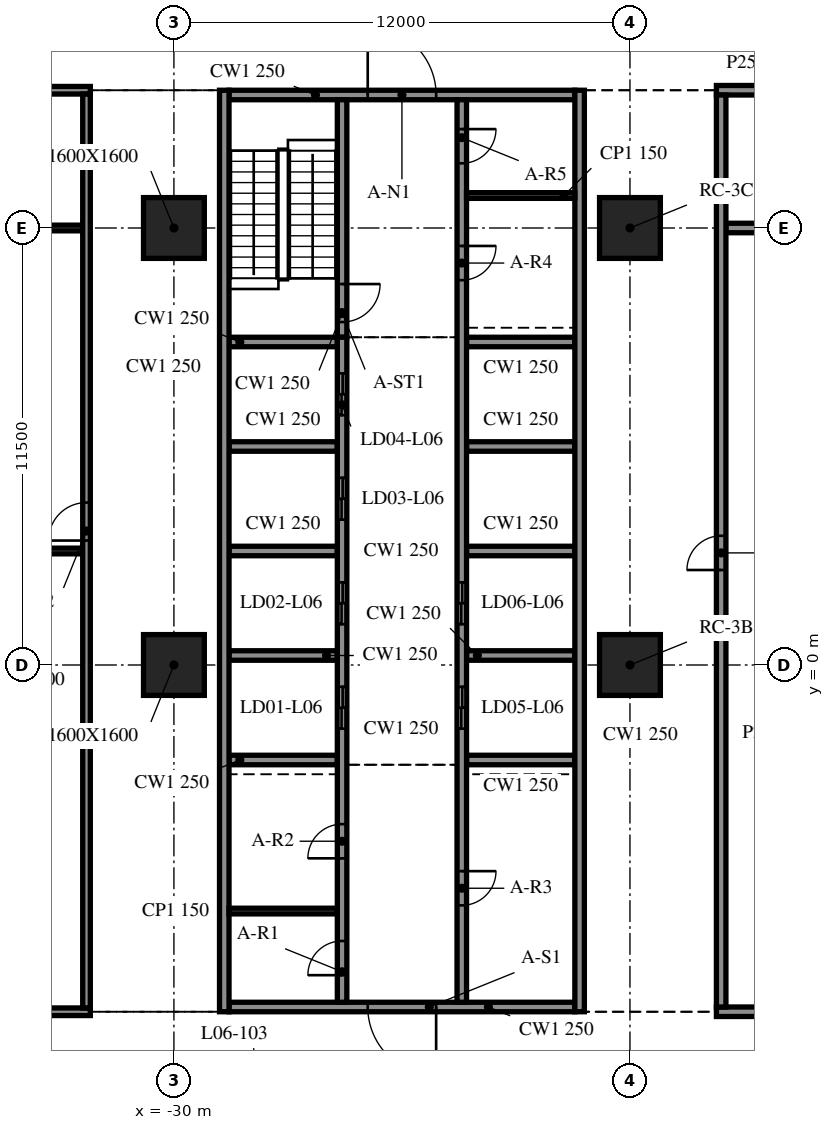
"""IFC4 building model, lengths in metres.
Left out: names, types, materials, properties, quantities, classifications, styles, units other than length and angle.
Written with IfcOpenShell. Run it as: python <this file> out.ifc"""

import sys

from ifc_helpers import new_model, si_unit, direction, frame, frame_2d, origin, origin_2d, place, context, subcontext, project, spatial, rectangle, extrude, element, fill, save


model = new_model("IFC4")
c1 = context("Model", 3, precision=1e-05, world=origin(), true_north=direction((0.0, 1.0)))
c2 = subcontext(c1, "Body", "Model", "MODEL_VIEW")
j1 = project(units=[si_unit("LENGTHUNIT", "METRE"), si_unit("PLANEANGLEUNIT", "RADIAN")], contexts=[c1])
p1 = place(None, origin())
s1 = spatial("IfcSite", under=j1, at=p1, CompositionType="ELEMENT")
p2 = place(p1, origin())
s2 = spatial("IfcBuilding", under=s1, at=p2, CompositionType="ELEMENT")
p3 = place(p2, frame((0.0, 0.0, 28.7)))
s3 = spatial("IfcBuildingStorey", under=s2, at=p3, CompositionType="ELEMENT", Elevation=28.7)
for number, where, z_axis, x_axis in (
    (1, (-30.0, 0.0, -0.34), (0.0, 0.0, 1.0), (1.0, 0.0, 0.0)),
    (2, (-30.0, 11.5, -0.34), (0.0, 0.0, 1.0), (1.0, 0.0, 0.0)),
    (3, (-18.0, 0.0, -0.34), (0.0, 0.0, 1.0), (1.0, 0.0, 0.0)),
    (4, (-18.0, 11.5, -0.34), (0.0, 0.0, 1.0), (1.0, 0.0, 0.0)),
):
    element("IfcColumn", number, at=place(p3, frame(where, z_axis=z_axis, x_axis=x_axis)), inside=s3, PredefinedType="COLUMN", context=c2, shape_type="SweptSolid", body=[
        extrude(rectangle(XDim=1.6, YDim=1.6, at=origin_2d()), origin(), (0.0, 0.0, 1.0), 4.3),
    ])
for number, where, z_axis, x_axis in (
    (5, (-28.675, 15.125, 0.0), (0.0, 0.0, 1.0), (0.0, -1.0, 0.0)),
    (6, (-19.325, -9.125, 0.0), (0.0, 0.0, 1.0), (0.0, 1.0, 0.0)),
):
    element("IfcWall", number, at=place(p3, frame(where, z_axis=z_axis, x_axis=x_axis)), inside=s3, PredefinedType="SOLIDWALL", context=c2, shape_type="SweptSolid", body=[
        extrude(rectangle(XDim=24.25, YDim=0.25, at=frame_2d((12.125, 0.0))), origin(), (0.0, 0.0, 1.0), 3.96),
    ])
p4 = place(p3, frame((-19.45, -9.0, 0.0), z_axis=(0.0, 0.0, 1.0), x_axis=(-1.0, 0.0, 0.0)))
e7 = element("IfcWall", 7, at=p4, inside=s3, PredefinedType="SOLIDWALL", context=c2, shape_type="SweptSolid", body=[
    extrude(rectangle(XDim=9.1, YDim=0.25, at=frame_2d((4.55, 0.0))), origin(), (0.0, 0.0, 1.0), 3.96),
])
p5 = place(p4, frame((3.65, 0.0, 0.0)))
e8 = element("IfcOpeningElement", 8, at=p5, cuts=e7, PredefinedType="OPENING", context=c2, shape_type="SweptSolid", body=[
    extrude(rectangle(XDim=1.8, YDim=2.1, at=frame_2d((0.9, 1.05))), frame((0.0, 0.135, 0.0), z_axis=(0.0, -1.0, 0.0), x_axis=(1.0, 0.0, 0.0)), (0.0, 0.0, 1.0), 0.27),
])
p6 = place(p3, frame((-28.55, 15.0, 0.0), z_axis=(0.0, 0.0, 1.0), x_axis=(1.0, 0.0, 0.0)))
e9 = element("IfcWall", 9, at=p6, inside=s3, PredefinedType="SOLIDWALL", context=c2, shape_type="SweptSolid", body=[
    extrude(rectangle(XDim=9.1, YDim=0.25, at=frame_2d((4.55, 0.0))), origin(), (0.0, 0.0, 1.0), 3.96),
])
p7 = place(p6, frame((3.65, 0.0, 0.0)))
e10 = element("IfcOpeningElement", 10, at=p7, cuts=e9, PredefinedType="OPENING", context=c2, shape_type="SweptSolid", body=[
    extrude(rectangle(XDim=1.8, YDim=2.1, at=frame_2d((0.9, 1.05))), frame((0.0, 0.135, 0.0), z_axis=(0.0, -1.0, 0.0), x_axis=(1.0, 0.0, 0.0)), (0.0, 0.0, 1.0), 0.27),
])
p8 = place(p3, frame((-25.575, -8.875, 0.0), z_axis=(0.0, 0.0, 1.0), x_axis=(0.0, 1.0, 0.0)))
e11 = element("IfcWall", 11, at=p8, inside=s3, PredefinedType="SOLIDWALL", context=c2, shape_type="SweptSolid", body=[
    extrude(rectangle(XDim=17.5, YDim=0.25, at=frame_2d((8.75, 0.0))), origin(), (0.0, 0.0, 1.0), 3.96),
])
p9 = place(p8, frame((7.2, 0.0, 0.0)))
e12 = element("IfcOpeningElement", 12, at=p9, cuts=e11, PredefinedType="OPENING", context=c2, shape_type="SweptSolid", body=[
    extrude(rectangle(XDim=1.1, YDim=2.1, at=frame_2d((0.55, 1.05))), frame((0.0, 0.135, 0.0), z_axis=(0.0, -1.0, 0.0), x_axis=(1.0, 0.0, 0.0)), (0.0, 0.0, 1.0), 0.27),
])
p10 = place(p8, frame((9.95, 0.0, 0.0)))
e13 = element("IfcOpeningElement", 13, at=p10, cuts=e11, PredefinedType="OPENING", context=c2, shape_type="SweptSolid", body=[
    extrude(rectangle(XDim=1.1, YDim=2.1, at=frame_2d((0.55, 1.05))), frame((0.0, 0.135, 0.0), z_axis=(0.0, -1.0, 0.0), x_axis=(1.0, 0.0, 0.0)), (0.0, 0.0, 1.0), 0.27),
])
p11 = place(p8, frame((12.7, 0.0, 0.0)))
e14 = element("IfcOpeningElement", 14, at=p11, cuts=e11, PredefinedType="OPENING", context=c2, shape_type="SweptSolid", body=[
    extrude(rectangle(XDim=1.1, YDim=2.1, at=frame_2d((0.55, 1.05))), frame((0.0, 0.135, 0.0), z_axis=(0.0, -1.0, 0.0), x_axis=(1.0, 0.0, 0.0)), (0.0, 0.0, 1.0), 0.27),
])
p12 = place(p8, frame((15.45, 0.0, 0.0)))
e15 = element("IfcOpeningElement", 15, at=p12, cuts=e11, PredefinedType="OPENING", context=c2, shape_type="SweptSolid", body=[
    extrude(rectangle(XDim=1.1, YDim=2.1, at=frame_2d((0.55, 1.05))), frame((0.0, 0.135, 0.0), z_axis=(0.0, -1.0, 0.0), x_axis=(1.0, 0.0, 0.0)), (0.0, 0.0, 1.0), 0.27),
])
p13 = place(p8, frame((0.712, 0.0, 0.0)))
e16 = element("IfcOpeningElement", 16, at=p13, cuts=e11, PredefinedType="OPENING", context=c2, shape_type="SweptSolid", body=[
    extrude(rectangle(XDim=0.9, YDim=2.1, at=frame_2d((0.45, 1.05))), frame((0.0, 0.135, 0.0), z_axis=(0.0, -1.0, 0.0), x_axis=(1.0, 0.0, 0.0)), (0.0, 0.0, 1.0), 0.27),
])
p14 = place(p8, frame((3.788, 0.0, 0.0)))
e17 = element("IfcOpeningElement", 17, at=p14, cuts=e11, PredefinedType="OPENING", context=c2, shape_type="SweptSolid", body=[
    extrude(rectangle(XDim=0.9, YDim=2.1, at=frame_2d((0.45, 1.05))), frame((0.0, 0.135, 0.0), z_axis=(0.0, -1.0, 0.0), x_axis=(1.0, 0.0, 0.0)), (0.0, 0.0, 1.0), 0.27),
])
p15 = place(p3, frame((-25.575, 14.875, 0.0), z_axis=(0.0, 0.0, 1.0), x_axis=(0.0, -1.0, 0.0)))
e18 = element("IfcWall", 18, at=p15, inside=s3, PredefinedType="SOLIDWALL", context=c2, shape_type="SweptSolid", body=[
    extrude(rectangle(XDim=6.25, YDim=0.25, at=frame_2d((3.125, 0.0))), origin(), (0.0, 0.0, 1.0), 3.96),
])
p16 = place(p15, frame((4.85, 0.0, 0.0)))
e19 = element("IfcOpeningElement", 19, at=p16, cuts=e18, PredefinedType="OPENING", context=c2, shape_type="SweptSolid", body=[
    extrude(rectangle(XDim=1.0, YDim=2.1, at=frame_2d((0.5, 1.05))), frame((0.0, 0.135, 0.0), z_axis=(0.0, -1.0, 0.0), x_axis=(1.0, 0.0, 0.0)), (0.0, 0.0, 1.0), 0.27),
])
p17 = place(p3, frame((-22.425, 14.875, 0.0), z_axis=(0.0, 0.0, 1.0), x_axis=(0.0, -1.0, 0.0)))
e20 = element("IfcWall", 20, at=p17, inside=s3, PredefinedType="SOLIDWALL", context=c2, shape_type="SweptSolid", body=[
    extrude(rectangle(XDim=23.75, YDim=0.25, at=frame_2d((11.875, 0.0))), origin(), (0.0, 0.0, 1.0), 3.96),
])
p18 = place(p17, frame((15.45, 0.0, 0.0)))
e21 = element("IfcOpeningElement", 21, at=p18, cuts=e20, PredefinedType="OPENING", context=c2, shape_type="SweptSolid", body=[
    extrude(rectangle(XDim=1.1, YDim=2.1, at=frame_2d((0.55, 1.05))), frame((0.0, 0.135, 0.0), z_axis=(0.0, -1.0, 0.0), x_axis=(1.0, 0.0, 0.0)), (0.0, 0.0, 1.0), 0.27),
])
p19 = place(p17, frame((12.7, 0.0, 0.0)))
e22 = element("IfcOpeningElement", 22, at=p19, cuts=e20, PredefinedType="OPENING", context=c2, shape_type="SweptSolid", body=[
    extrude(rectangle(XDim=1.1, YDim=2.1, at=frame_2d((0.55, 1.05))), frame((0.0, 0.135, 0.0), z_axis=(0.0, -1.0, 0.0), x_axis=(1.0, 0.0, 0.0)), (0.0, 0.0, 1.0), 0.27),
])
p20 = place(p17, frame((20.3, 0.0, 0.0)))
e23 = element("IfcOpeningElement", 23, at=p20, cuts=e20, PredefinedType="OPENING", context=c2, shape_type="SweptSolid", body=[
    extrude(rectangle(XDim=0.9, YDim=2.1, at=frame_2d((0.45, 1.05))), frame((0.0, 0.135, 0.0), z_axis=(0.0, -1.0, 0.0), x_axis=(1.0, 0.0, 0.0)), (0.0, 0.0, 1.0), 0.27),
])
p21 = place(p17, frame((3.847, 0.0, 0.0)))
e24 = element("IfcOpeningElement", 24, at=p21, cuts=e20, PredefinedType="OPENING", context=c2, shape_type="SweptSolid", body=[
    extrude(rectangle(XDim=0.9, YDim=2.1, at=frame_2d((0.45, 1.05))), frame((0.0, 0.135, 0.0), z_axis=(0.0, -1.0, 0.0), x_axis=(1.0, 0.0, 0.0)), (0.0, 0.0, 1.0), 0.27),
])
p22 = place(p17, frame((0.772, 0.0, 0.0)))
e25 = element("IfcOpeningElement", 25, at=p22, cuts=e20, PredefinedType="OPENING", context=c2, shape_type="SweptSolid", body=[
    extrude(rectangle(XDim=0.9, YDim=2.1, at=frame_2d((0.45, 1.05))), frame((0.0, 0.135, 0.0), z_axis=(0.0, -1.0, 0.0), x_axis=(1.0, 0.0, 0.0)), (0.0, 0.0, 1.0), 0.27),
])
for number, where, z_axis, x_axis in (
    (26, (-28.55, -2.5, 0.0), (0.0, 0.0, 1.0), (1.0, 0.0, 0.0)),
    (27, (-28.55, 0.25, 0.0), (0.0, 0.0, 1.0), (1.0, 0.0, 0.0)),
    (28, (-28.55, 3.0, 0.0), (0.0, 0.0, 1.0), (1.0, 0.0, 0.0)),
    (29, (-28.55, 5.75, 0.0), (0.0, 0.0, 1.0), (1.0, 0.0, 0.0)),
    (30, (-28.55, 8.5, 0.0), (0.0, 0.0, 1.0), (1.0, 0.0, 0.0)),
    (31, (-22.3, -2.5, 0.0), (0.0, 0.0, 1.0), (1.0, 0.0, 0.0)),
    (32, (-22.3, 0.25, 0.0), (0.0, 0.0, 1.0), (1.0, 0.0, 0.0)),
    (33, (-22.3, 3.0, 0.0), (0.0, 0.0, 1.0), (1.0, 0.0, 0.0)),
    (34, (-22.3, 5.75, 0.0), (0.0, 0.0, 1.0), (1.0, 0.0, 0.0)),
    (35, (-22.3, 8.5, 0.0), (0.0, 0.0, 1.0), (1.0, 0.0, 0.0)),
):
    element("IfcWall", number, at=place(p3, frame(where, z_axis=z_axis, x_axis=x_axis)), inside=s3, PredefinedType="SOLIDWALL", context=c2, shape_type="SweptSolid", body=[
        extrude(rectangle(XDim=2.85, YDim=0.25, at=frame_2d((1.425, 0.0))), origin(), (0.0, 0.0, 1.0), 3.96),
    ])
for number, where, z_axis, x_axis in (
    (36, (-28.55, -6.475, 0.0), (0.0, 0.0, 1.0), (1.0, 0.0, 0.0)),
    (37, (-22.3, 12.355, 0.0), (0.0, 0.0, 1.0), (1.0, 0.0, 0.0)),
):
    element("IfcWall", number, at=place(p3, frame(where, z_axis=z_axis, x_axis=x_axis)), inside=s3, PredefinedType="PARTITIONING", context=c2, shape_type="SweptSolid", body=[
        extrude(rectangle(XDim=2.85, YDim=0.15, at=frame_2d((1.425, 0.0))), origin(), (0.0, 0.0, 1.0), 3.96),
    ])
p23 = place(p3, frame((-45.55, -9.125, 0.0), z_axis=(0.0, 0.0, 1.0), x_axis=(1.0, 0.0, 0.0)))
e38 = element("IfcWall", 38, at=p23, inside=s3, PredefinedType="PARTITIONING", context=c2, shape_type="SweptSolid", body=[
    extrude(rectangle(XDim=13.35, YDim=0.2, at=frame_2d((6.675, 0.0))), origin(), (0.0, 0.0, 1.0), 3.96),
])
p24 = place(p23, frame((6.9, 0.0, 0.0)))
e39 = element("IfcOpeningElement", 39, at=p24, cuts=e38, PredefinedType="OPENING", context=c2, shape_type="SweptSolid", body=[
    extrude(rectangle(XDim=1.2, YDim=2.1, at=frame_2d((0.6, 1.05))), frame((0.0, 0.11, 0.0), z_axis=(0.0, -1.0, 0.0), x_axis=(1.0, 0.0, 0.0)), (0.0, 0.0, 1.0), 0.22),
])
p25 = place(p3, frame((-15.725, -9.125, 0.0), z_axis=(0.0, 0.0, 1.0), x_axis=(1.0, 0.0, 0.0)))
e40 = element("IfcWall", 40, at=p25, inside=s3, PredefinedType="PARTITIONING", context=c2, shape_type="SweptSolid", body=[
    extrude(rectangle(XDim=7.35, YDim=0.25, at=frame_2d((3.675, 0.0))), origin(), (0.0, 0.0, 1.0), 3.96),
])
p26 = place(p3, frame((-45.35, 3.0, 0.0), z_axis=(0.0, 0.0, 1.0), x_axis=(1.0, 0.0, 0.0)))
e41 = element("IfcWall", 41, at=p26, inside=s3, PredefinedType="PARTITIONING", context=c2, shape_type="SweptSolid", body=[
    extrude(rectangle(XDim=12.95, YDim=0.15, at=frame_2d((6.475, 0.0))), origin(), (0.0, 0.0, 1.0), 3.96),
])
p27 = place(p3, frame((-41.2, 11.5, 0.0), z_axis=(0.0, 0.0, 1.0), x_axis=(1.0, 0.0, 0.0)))
e42 = element("IfcWall", 42, at=p27, inside=s3, PredefinedType="PARTITIONING", context=c2, shape_type="SweptSolid", body=[
    extrude(rectangle(XDim=8.8, YDim=0.15, at=frame_2d((4.4, 0.0))), origin(), (0.0, 0.0, 1.0), 3.96),
])
p28 = place(p3, frame((-15.475, 11.5, 0.0), z_axis=(0.0, 0.0, 1.0), x_axis=(1.0, 0.0, 0.0)))
e43 = element("IfcWall", 43, at=p28, inside=s3, PredefinedType="PARTITIONING", context=c2, shape_type="SweptSolid", body=[
    extrude(rectangle(XDim=6.85, YDim=0.25, at=frame_2d((3.425, 0.0))), origin(), (0.0, 0.0, 1.0), 3.96),
])
p29 = place(p3, frame((-45.55, 15.125, 0.0), z_axis=(0.0, 0.0, 1.0), x_axis=(1.0, 0.0, 0.0)))
e44 = element("IfcWall", 44, at=p29, inside=s3, PredefinedType="PARTITIONING", context=c2, shape_type="SweptSolid", body=[
    extrude(rectangle(XDim=13.35, YDim=0.2, at=frame_2d((6.675, 0.0))), origin(), (0.0, 0.0, 1.0), 3.96),
])
p30 = place(p29, frame((5.3, 0.0, 0.0)))
e45 = element("IfcOpeningElement", 45, at=p30, cuts=e44, PredefinedType="OPENING", context=c2, shape_type="SweptSolid", body=[
    extrude(rectangle(XDim=1.0, YDim=2.1, at=frame_2d((0.5, 1.05))), frame((0.0, 0.11, 0.0), z_axis=(0.0, -1.0, 0.0), x_axis=(1.0, 0.0, 0.0)), (0.0, 0.0, 1.0), 0.22),
])
p31 = place(p29, frame((6.9, 0.0, 0.0)))
e46 = element("IfcOpeningElement", 46, at=p31, cuts=e44, PredefinedType="OPENING", context=c2, shape_type="SweptSolid", body=[
    extrude(rectangle(XDim=1.0, YDim=2.1, at=frame_2d((0.5, 1.05))), frame((0.0, 0.11, 0.0), z_axis=(0.0, -1.0, 0.0), x_axis=(1.0, 0.0, 0.0)), (0.0, 0.0, 1.0), 0.22),
])
p32 = place(p3, frame((-15.725, 15.125, 0.0), z_axis=(0.0, 0.0, 1.0), x_axis=(1.0, 0.0, 0.0)))
e47 = element("IfcWall", 47, at=p32, inside=s3, PredefinedType="PARTITIONING", context=c2, shape_type="SweptSolid", body=[
    extrude(rectangle(XDim=7.35, YDim=0.25, at=frame_2d((3.675, 0.0))), origin(), (0.0, 0.0, 1.0), 3.96),
])
p33 = place(p32, frame((3.3, 0.0, 0.0)))
e48 = element("IfcOpeningElement", 48, at=p33, cuts=e47, PredefinedType="OPENING", context=c2, shape_type="SweptSolid", body=[
    extrude(rectangle(XDim=0.9, YDim=2.1, at=frame_2d((0.45, 1.05))), frame((0.0, 0.135, 0.0), z_axis=(0.0, -1.0, 0.0), x_axis=(1.0, 0.0, 0.0)), (0.0, 0.0, 1.0), 0.27),
])
p34 = place(p3, frame((-32.3, -9.025, 0.0), z_axis=(0.0, 0.0, 1.0), x_axis=(0.0, 1.0, 0.0)))
e49 = element("IfcWall", 49, at=p34, inside=s3, PredefinedType="PARTITIONING", context=c2, shape_type="SweptSolid", body=[
    extrude(rectangle(XDim=24.05, YDim=0.2, at=frame_2d((12.025, 0.0))), origin(), (0.0, 0.0, 1.0), 3.96),
])
p35 = place(p34, frame((12.3, 0.0, 0.0)))
e50 = element("IfcOpeningElement", 50, at=p35, cuts=e49, PredefinedType="OPENING", context=c2, shape_type="SweptSolid", body=[
    extrude(rectangle(XDim=1.0, YDim=2.1, at=frame_2d((0.5, 1.05))), frame((0.0, 0.11, 0.0), z_axis=(0.0, -1.0, 0.0), x_axis=(1.0, 0.0, 0.0)), (0.0, 0.0, 1.0), 0.22),
])
p36 = place(p3, frame((-15.6, -9.0, 0.0), z_axis=(0.0, 0.0, 1.0), x_axis=(0.0, 1.0, 0.0)))
e51 = element("IfcWall", 51, at=p36, inside=s3, PredefinedType="PARTITIONING", context=c2, shape_type="SweptSolid", body=[
    extrude(rectangle(XDim=24.0, YDim=0.25, at=frame_2d((12.0, 0.0))), origin(), (0.0, 0.0, 1.0), 3.96),
])
p37 = place(p36, frame((11.5, 0.0, 0.0)))
e52 = element("IfcOpeningElement", 52, at=p37, cuts=e51, PredefinedType="OPENING", context=c2, shape_type="SweptSolid", body=[
    extrude(rectangle(XDim=0.9, YDim=2.1, at=frame_2d((0.45, 1.05))), frame((0.0, 0.135, 0.0), z_axis=(0.0, -1.0, 0.0), x_axis=(1.0, 0.0, 0.0)), (0.0, 0.0, 1.0), 0.27),
])
p38 = place(p5, origin())
e53 = element("IfcDoor", 53, at=p38, inside=s3, OperationType="DOUBLE_DOOR_SINGLE_SWING", PredefinedType="DOOR", context=c2, shape_type="SweptSolid", body=[
    extrude(rectangle(XDim=1.8, YDim=2.1, at=frame_2d((0.9, 1.05))), frame((0.0, 0.025, 0.0), z_axis=(0.0, -1.0, 0.0), x_axis=(1.0, 0.0, 0.0)), (0.0, 0.0, 1.0), 0.05),
])
fill(e8, e53)
p39 = place(p7, origin())
e54 = element("IfcDoor", 54, at=p39, inside=s3, OperationType="DOUBLE_DOOR_SINGLE_SWING", PredefinedType="DOOR", context=c2, shape_type="SweptSolid", body=[
    extrude(rectangle(XDim=1.8, YDim=2.1, at=frame_2d((0.9, 1.05))), frame((0.0, 0.025, 0.0), z_axis=(0.0, -1.0, 0.0), x_axis=(1.0, 0.0, 0.0)), (0.0, 0.0, 1.0), 0.05),
])
fill(e10, e54)
p40 = place(p18, origin())
e55 = element("IfcDoor", 55, at=p40, inside=s3, OperationType="DOUBLE_DOOR_SLIDING", PredefinedType="DOOR", context=c2, shape_type="SweptSolid", body=[
    extrude(rectangle(XDim=1.1, YDim=2.1, at=frame_2d((0.55, 1.05))), frame((0.0, 0.025, 0.0), z_axis=(0.0, -1.0, 0.0), x_axis=(1.0, 0.0, 0.0)), (0.0, 0.0, 1.0), 0.05),
])
fill(e21, e55)
p41 = place(p19, origin())
e56 = element("IfcDoor", 56, at=p41, inside=s3, OperationType="DOUBLE_DOOR_SLIDING", PredefinedType="DOOR", context=c2, shape_type="SweptSolid", body=[
    extrude(rectangle(XDim=1.1, YDim=2.1, at=frame_2d((0.55, 1.05))), frame((0.0, 0.025, 0.0), z_axis=(0.0, -1.0, 0.0), x_axis=(1.0, 0.0, 0.0)), (0.0, 0.0, 1.0), 0.05),
])
fill(e22, e56)
p42 = place(p9, origin())
e57 = element("IfcDoor", 57, at=p42, inside=s3, OperationType="DOUBLE_DOOR_SLIDING", PredefinedType="DOOR", context=c2, shape_type="SweptSolid", body=[
    extrude(rectangle(XDim=1.1, YDim=2.1, at=frame_2d((0.55, 1.05))), frame((0.0, 0.025, 0.0), z_axis=(0.0, -1.0, 0.0), x_axis=(1.0, 0.0, 0.0)), (0.0, 0.0, 1.0), 0.05),
])
fill(e12, e57)
p43 = place(p10, origin())
e58 = element("IfcDoor", 58, at=p43, inside=s3, OperationType="DOUBLE_DOOR_SLIDING", PredefinedType="DOOR", context=c2, shape_type="SweptSolid", body=[
    extrude(rectangle(XDim=1.1, YDim=2.1, at=frame_2d((0.55, 1.05))), frame((0.0, 0.025, 0.0), z_axis=(0.0, -1.0, 0.0), x_axis=(1.0, 0.0, 0.0)), (0.0, 0.0, 1.0), 0.05),
])
fill(e13, e58)
p44 = place(p11, origin())
e59 = element("IfcDoor", 59, at=p44, inside=s3, OperationType="DOUBLE_DOOR_SLIDING", PredefinedType="DOOR", context=c2, shape_type="SweptSolid", body=[
    extrude(rectangle(XDim=1.1, YDim=2.1, at=frame_2d((0.55, 1.05))), frame((0.0, 0.025, 0.0), z_axis=(0.0, -1.0, 0.0), x_axis=(1.0, 0.0, 0.0)), (0.0, 0.0, 1.0), 0.05),
])
fill(e14, e59)
p45 = place(p12, origin())
e60 = element("IfcDoor", 60, at=p45, inside=s3, OperationType="DOUBLE_DOOR_SLIDING", PredefinedType="DOOR", context=c2, shape_type="SweptSolid", body=[
    extrude(rectangle(XDim=1.1, YDim=2.1, at=frame_2d((0.55, 1.05))), frame((0.0, 0.025, 0.0), z_axis=(0.0, -1.0, 0.0), x_axis=(1.0, 0.0, 0.0)), (0.0, 0.0, 1.0), 0.05),
])
fill(e15, e60)
p46 = place(p13, origin())
e61 = element("IfcDoor", 61, at=p46, inside=s3, OperationType="SINGLE_SWING_LEFT", PredefinedType="DOOR", context=c2, shape_type="SweptSolid", body=[
    extrude(rectangle(XDim=0.9, YDim=2.1, at=frame_2d((0.45, 1.05))), frame((0.0, 0.025, 0.0), z_axis=(0.0, -1.0, 0.0), x_axis=(1.0, 0.0, 0.0)), (0.0, 0.0, 1.0), 0.05),
])
fill(e16, e61)
p47 = place(p14, origin())
e62 = element("IfcDoor", 62, at=p47, inside=s3, OperationType="SINGLE_SWING_RIGHT", PredefinedType="DOOR", context=c2, shape_type="SweptSolid", body=[
    extrude(rectangle(XDim=0.9, YDim=2.1, at=frame_2d((0.45, 1.05))), frame((0.0, 0.025, 0.0), z_axis=(0.0, -1.0, 0.0), x_axis=(1.0, 0.0, 0.0)), (0.0, 0.0, 1.0), 0.05),
])
fill(e17, e62)
p48 = place(p20, origin())
e63 = element("IfcDoor", 63, at=p48, inside=s3, OperationType="SINGLE_SWING_LEFT", PredefinedType="DOOR", context=c2, shape_type="SweptSolid", body=[
    extrude(rectangle(XDim=0.9, YDim=2.1, at=frame_2d((0.45, 1.05))), frame((0.0, 0.025, 0.0), z_axis=(0.0, -1.0, 0.0), x_axis=(1.0, 0.0, 0.0)), (0.0, 0.0, 1.0), 0.05),
])
fill(e23, e63)
p49 = place(p21, origin())
e64 = element("IfcDoor", 64, at=p49, inside=s3, OperationType="SINGLE_SWING_RIGHT", PredefinedType="DOOR", context=c2, shape_type="SweptSolid", body=[
    extrude(rectangle(XDim=0.9, YDim=2.1, at=frame_2d((0.45, 1.05))), frame((0.0, 0.025, 0.0), z_axis=(0.0, -1.0, 0.0), x_axis=(1.0, 0.0, 0.0)), (0.0, 0.0, 1.0), 0.05),
])
fill(e24, e64)
p50 = place(p22, origin())
e65 = element("IfcDoor", 65, at=p50, inside=s3, OperationType="SINGLE_SWING_LEFT", PredefinedType="DOOR", context=c2, shape_type="SweptSolid", body=[
    extrude(rectangle(XDim=0.9, YDim=2.1, at=frame_2d((0.45, 1.05))), frame((0.0, 0.025, 0.0), z_axis=(0.0, -1.0, 0.0), x_axis=(1.0, 0.0, 0.0)), (0.0, 0.0, 1.0), 0.05),
])
fill(e25, e65)
p51 = place(p16, origin())
e66 = element("IfcDoor", 66, at=p51, inside=s3, OperationType="SINGLE_SWING_RIGHT", PredefinedType="DOOR", context=c2, shape_type="SweptSolid", body=[
    extrude(rectangle(XDim=1.0, YDim=2.1, at=frame_2d((0.5, 1.05))), frame((0.0, 0.025, 0.0), z_axis=(0.0, -1.0, 0.0), x_axis=(1.0, 0.0, 0.0)), (0.0, 0.0, 1.0), 0.05),
])
fill(e19, e66)
p52 = place(p37, origin())
e67 = element("IfcDoor", 67, at=p52, inside=s3, OperationType="SINGLE_SWING_RIGHT", PredefinedType="DOOR", context=c2, shape_type="SweptSolid", body=[
    extrude(rectangle(XDim=0.9, YDim=2.1, at=frame_2d((0.45, 1.05))), frame((0.0, 0.025, 0.0), z_axis=(0.0, -1.0, 0.0), x_axis=(1.0, 0.0, 0.0)), (0.0, 0.0, 1.0), 0.05),
])
fill(e52, e67)
p53 = place(p35, origin())
e68 = element("IfcDoor", 68, at=p53, inside=s3, OperationType="SINGLE_SWING_RIGHT", PredefinedType="DOOR", context=c2, shape_type="SweptSolid", body=[
    extrude(rectangle(XDim=1.0, YDim=2.1, at=frame_2d((0.5, 1.05))), frame((0.0, 0.025, 0.0), z_axis=(0.0, -1.0, 0.0), x_axis=(1.0, 0.0, 0.0)), (0.0, 0.0, 1.0), 0.05),
])
fill(e50, e68)
save(model, sys.argv[1])
